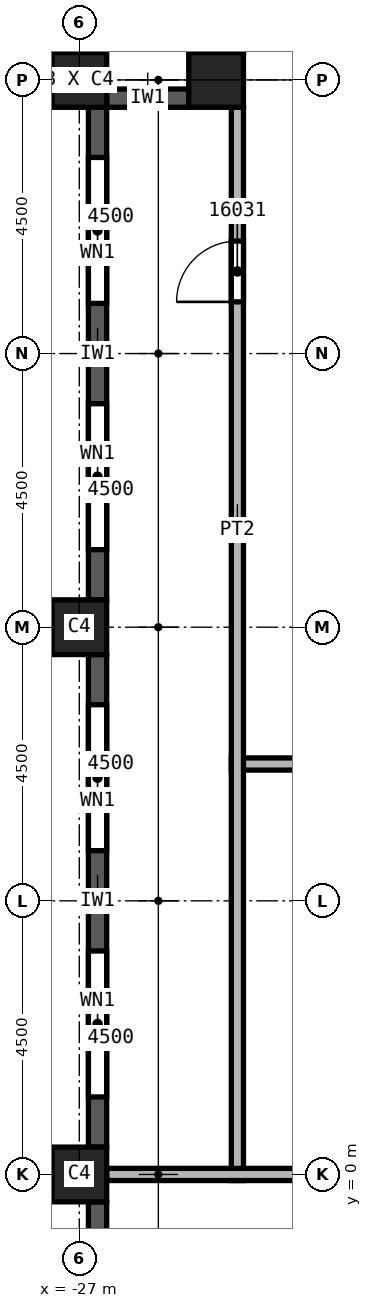
"""IFC4 building model, lengths in metres.
Left out: names, types, materials, properties, quantities, classifications, styles, units other than length and angle.
Written with IfcOpenShell. Run it as: python <this file> out.ifc"""

import sys

from ifc_helpers import new_model, si_unit, direction, frame, frame_2d, origin, origin_2d, place, context, subcontext, project, spatial, rectangle, extrude, element, fill, save


model = new_model("IFC4")
c1 = context("Model", 3, precision=1e-05, world=origin(), true_north=direction((0.0, 1.0)))
c2 = subcontext(c1, "Body", "Model", "MODEL_VIEW")
j1 = project(units=[si_unit("LENGTHUNIT", "METRE"), si_unit("PLANEANGLEUNIT", "RADIAN")], contexts=[c1])
p1 = place(None, origin())
s1 = spatial("IfcSite", under=j1, at=p1, CompositionType="ELEMENT")
p2 = place(p1, origin())
s2 = spatial("IfcBuilding", under=s1, at=p2, CompositionType="ELEMENT")
p3 = place(p2, frame((0.0, 0.0, 246.0)))
s3 = spatial("IfcBuildingStorey", under=s2, at=p3, CompositionType="ELEMENT", Elevation=246.0)
for number, where, z_axis, x_axis in (
    (1, (-27.0, 0.0, 0.0), (0.0, 0.0, 1.0), (0.0, 1.0, 0.0)),
    (2, (-27.0, 9.0, 0.0), (0.0, 0.0, 1.0), (0.0, 1.0, 0.0)),
    (3, (-27.0, 18.0, 0.0), (0.0, 0.0, 1.0), (0.0, 1.0, 0.0)),
    (4, (-24.75, 18.0, 0.0), (0.0, 0.0, 1.0), (1.0, 0.0, 0.0)),
):
    element("IfcColumn", number, at=place(p3, frame(where, z_axis=z_axis, x_axis=x_axis)), inside=s3, PredefinedType="COLUMN", context=c2, shape_type="SweptSolid", body=[
        extrude(rectangle(XDim=0.9, YDim=0.9, at=origin_2d()), origin(), (0.0, 0.0, 1.0), 3.72),
    ])
p4 = place(p3, frame((-24.45, 19.725, 0.0), z_axis=(0.0, 0.0, 1.0), x_axis=(0.0, -1.0, 0.0)))
e5 = element("IfcWall", 5, at=p4, inside=s3, PredefinedType="SOLIDWALL", context=c2, shape_type="SweptSolid", body=[
    extrude(rectangle(XDim=1.275, YDim=0.3, at=frame_2d((0.638, 0.0))), origin(), (0.0, 0.0, 1.0), 3.12),
])
p5 = place(p3, frame((-25.2, 17.7, 0.0), z_axis=(0.0, 0.0, 1.0), x_axis=(-1.0, 0.0, 0.0)))
e6 = element("IfcWall", 6, at=p5, inside=s3, PredefinedType="SOLIDWALL", context=c2, shape_type="SweptSolid", body=[
    extrude(rectangle(XDim=1.35, YDim=0.3, at=frame_2d((0.675, 0.0))), origin(), (0.0, 0.0, 1.0), 3.12),
])
p6 = place(p3, frame((-26.7, 17.55, 0.0), z_axis=(0.0, 0.0, 1.0), x_axis=(0.0, -1.0, 0.0)))
e7 = element("IfcWall", 7, at=p6, inside=s3, PredefinedType="SOLIDWALL", context=c2, shape_type="SweptSolid", body=[
    extrude(rectangle(XDim=8.1, YDim=0.3, at=frame_2d((4.05, 0.0))), origin(), (0.0, 0.0, 1.0), 3.12),
])
p7 = place(p6, frame((0.825, 0.0, 0.8)))
e8 = element("IfcOpeningElement", 8, at=p7, cuts=e7, PredefinedType="OPENING", context=c2, shape_type="SweptSolid", body=[
    extrude(rectangle(XDim=2.4, YDim=1.95, at=frame_2d((1.2, 0.975))), frame((0.0, 0.15, 0.0), z_axis=(0.0, -1.0, 0.0), x_axis=(1.0, 0.0, 0.0)), (0.0, 0.0, 1.0), 0.3),
])
p8 = place(p6, frame((4.875, 0.0, 0.8)))
e9 = element("IfcOpeningElement", 9, at=p8, cuts=e7, PredefinedType="OPENING", context=c2, shape_type="SweptSolid", body=[
    extrude(rectangle(XDim=2.4, YDim=1.95, at=frame_2d((1.2, 0.975))), frame((0.0, 0.15, 0.0), z_axis=(0.0, -1.0, 0.0), x_axis=(1.0, 0.0, 0.0)), (0.0, 0.0, 1.0), 0.3),
])
p9 = place(p3, frame((-26.7, 8.55, 0.0), z_axis=(0.0, 0.0, 1.0), x_axis=(0.0, -1.0, 0.0)))
e10 = element("IfcWall", 10, at=p9, inside=s3, PredefinedType="SOLIDWALL", context=c2, shape_type="SweptSolid", body=[
    extrude(rectangle(XDim=8.1, YDim=0.3, at=frame_2d((4.05, 0.0))), origin(), (0.0, 0.0, 1.0), 3.12),
])
p10 = place(p9, frame((0.825, 0.0, 0.8)))
e11 = element("IfcOpeningElement", 11, at=p10, cuts=e10, PredefinedType="OPENING", context=c2, shape_type="SweptSolid", body=[
    extrude(rectangle(XDim=2.4, YDim=1.95, at=frame_2d((1.2, 0.975))), frame((0.0, 0.15, 0.0), z_axis=(0.0, -1.0, 0.0), x_axis=(1.0, 0.0, 0.0)), (0.0, 0.0, 1.0), 0.3),
])
p11 = place(p9, frame((4.875, 0.0, 0.8)))
e12 = element("IfcOpeningElement", 12, at=p11, cuts=e10, PredefinedType="OPENING", context=c2, shape_type="SweptSolid", body=[
    extrude(rectangle(XDim=2.4, YDim=1.95, at=frame_2d((1.2, 0.975))), frame((0.0, 0.15, 0.0), z_axis=(0.0, -1.0, 0.0), x_axis=(1.0, 0.0, 0.0)), (0.0, 0.0, 1.0), 0.3),
])
p12 = place(p3, frame((-26.7, -0.45, 0.0), z_axis=(0.0, 0.0, 1.0), x_axis=(0.0, -1.0, 0.0)))
e13 = element("IfcWall", 13, at=p12, inside=s3, PredefinedType="SOLIDWALL", context=c2, shape_type="SweptSolid", body=[
    extrude(rectangle(XDim=8.1, YDim=0.3, at=frame_2d((4.05, 0.0))), origin(), (0.0, 0.0, 1.0), 3.12),
])
p13 = place(p12, frame((0.825, 0.0, 0.8)))
e14 = element("IfcOpeningElement", 14, at=p13, cuts=e13, PredefinedType="OPENING", context=c2, shape_type="SweptSolid", body=[
    extrude(rectangle(XDim=2.4, YDim=1.95, at=frame_2d((1.2, 0.975))), frame((0.0, 0.15, 0.0), z_axis=(0.0, -1.0, 0.0), x_axis=(1.0, 0.0, 0.0)), (0.0, 0.0, 1.0), 0.3),
])
p14 = place(p12, frame((4.875, 0.0, 0.8)))
e15 = element("IfcOpeningElement", 15, at=p14, cuts=e13, PredefinedType="OPENING", context=c2, shape_type="SweptSolid", body=[
    extrude(rectangle(XDim=2.4, YDim=1.95, at=frame_2d((1.2, 0.975))), frame((0.0, 0.15, 0.0), z_axis=(0.0, -1.0, 0.0), x_axis=(1.0, 0.0, 0.0)), (0.0, 0.0, 1.0), 0.3),
])
p15 = place(p3, frame((-24.5, 6.75, 0.0), z_axis=(0.0, 0.0, 1.0), x_axis=(1.0, 0.0, 0.0)))
e16 = element("IfcWall", 16, at=p15, inside=s3, PredefinedType="PARTITIONING", context=c2, shape_type="SweptSolid", body=[
    extrude(rectangle(XDim=4.6, YDim=0.2, at=frame_2d((2.3, 0.0))), origin(), (0.0, 0.0, 1.0), 3.72),
])
p16 = place(p3, frame((-24.4, -0.1, 0.0), z_axis=(0.0, 0.0, 1.0), x_axis=(0.0, 1.0, 0.0)))
e17 = element("IfcWall", 17, at=p16, inside=s3, PredefinedType="PARTITIONING", context=c2, shape_type="SweptSolid", body=[
    extrude(rectangle(XDim=17.65, YDim=0.2, at=frame_2d((8.825, 0.0))), origin(), (0.0, 0.0, 1.0), 3.72),
])
p17 = place(p16, frame((14.45, 0.0, 0.0)))
e18 = element("IfcOpeningElement", 18, at=p17, cuts=e17, PredefinedType="OPENING", context=c2, shape_type="SweptSolid", body=[
    extrude(rectangle(XDim=1.0, YDim=2.1, at=frame_2d((0.5, 1.05))), frame((0.0, 0.1, 0.0), z_axis=(0.0, -1.0, 0.0), x_axis=(1.0, 0.0, 0.0)), (0.0, 0.0, 1.0), 0.2),
])
p18 = place(p3, frame((-19.9, 0.0, 0.0), z_axis=(0.0, 0.0, 1.0), x_axis=(-1.0, 0.0, 0.0)))
e19 = element("IfcWall", 19, at=p18, inside=s3, PredefinedType="PARTITIONING", context=c2, shape_type="SweptSolid", body=[
    extrude(rectangle(XDim=6.65, YDim=0.2, at=frame_2d((3.325, 0.0))), origin(), (0.0, 0.0, 1.0), 3.72),
])
p19 = place(p7, origin())
e20 = element("IfcWindow", 20, at=p19, inside=s3, PartitioningType="SINGLE_PANEL", PredefinedType="WINDOW", context=c2, shape_type="SweptSolid", body=[
    extrude(rectangle(XDim=2.4, YDim=1.95, at=frame_2d((1.2, 0.975))), frame((0.0, 0.03, 0.0), z_axis=(0.0, -1.0, 0.0), x_axis=(1.0, 0.0, 0.0)), (0.0, 0.0, 1.0), 0.06),
])
fill(e8, e20)
p20 = place(p8, origin())
e21 = element("IfcWindow", 21, at=p20, inside=s3, PartitioningType="SINGLE_PANEL", PredefinedType="WINDOW", context=c2, shape_type="SweptSolid", body=[
    extrude(rectangle(XDim=2.4, YDim=1.95, at=frame_2d((1.2, 0.975))), frame((0.0, 0.03, 0.0), z_axis=(0.0, -1.0, 0.0), x_axis=(1.0, 0.0, 0.0)), (0.0, 0.0, 1.0), 0.06),
])
fill(e9, e21)
p21 = place(p10, origin())
e22 = element("IfcWindow", 22, at=p21, inside=s3, PartitioningType="SINGLE_PANEL", PredefinedType="WINDOW", context=c2, shape_type="SweptSolid", body=[
    extrude(rectangle(XDim=2.4, YDim=1.95, at=frame_2d((1.2, 0.975))), frame((0.0, 0.03, 0.0), z_axis=(0.0, -1.0, 0.0), x_axis=(1.0, 0.0, 0.0)), (0.0, 0.0, 1.0), 0.06),
])
fill(e11, e22)
p22 = place(p11, origin())
e23 = element("IfcWindow", 23, at=p22, inside=s3, PartitioningType="SINGLE_PANEL", PredefinedType="WINDOW", context=c2, shape_type="SweptSolid", body=[
    extrude(rectangle(XDim=2.4, YDim=1.95, at=frame_2d((1.2, 0.975))), frame((0.0, 0.03, 0.0), z_axis=(0.0, -1.0, 0.0), x_axis=(1.0, 0.0, 0.0)), (0.0, 0.0, 1.0), 0.06),
])
fill(e12, e23)
p23 = place(p17, origin())
e24 = element("IfcDoor", 24, at=p23, inside=s3, OperationType="SINGLE_SWING_RIGHT", PredefinedType="DOOR", context=c2, shape_type="SweptSolid", body=[
    extrude(rectangle(XDim=1.0, YDim=2.1, at=frame_2d((0.5, 1.05))), frame((0.0, 0.025, 0.0), z_axis=(0.0, -1.0, 0.0), x_axis=(1.0, 0.0, 0.0)), (0.0, 0.0, 1.0), 0.05),
])
fill(e18, e24)
save(model, sys.argv[1])
